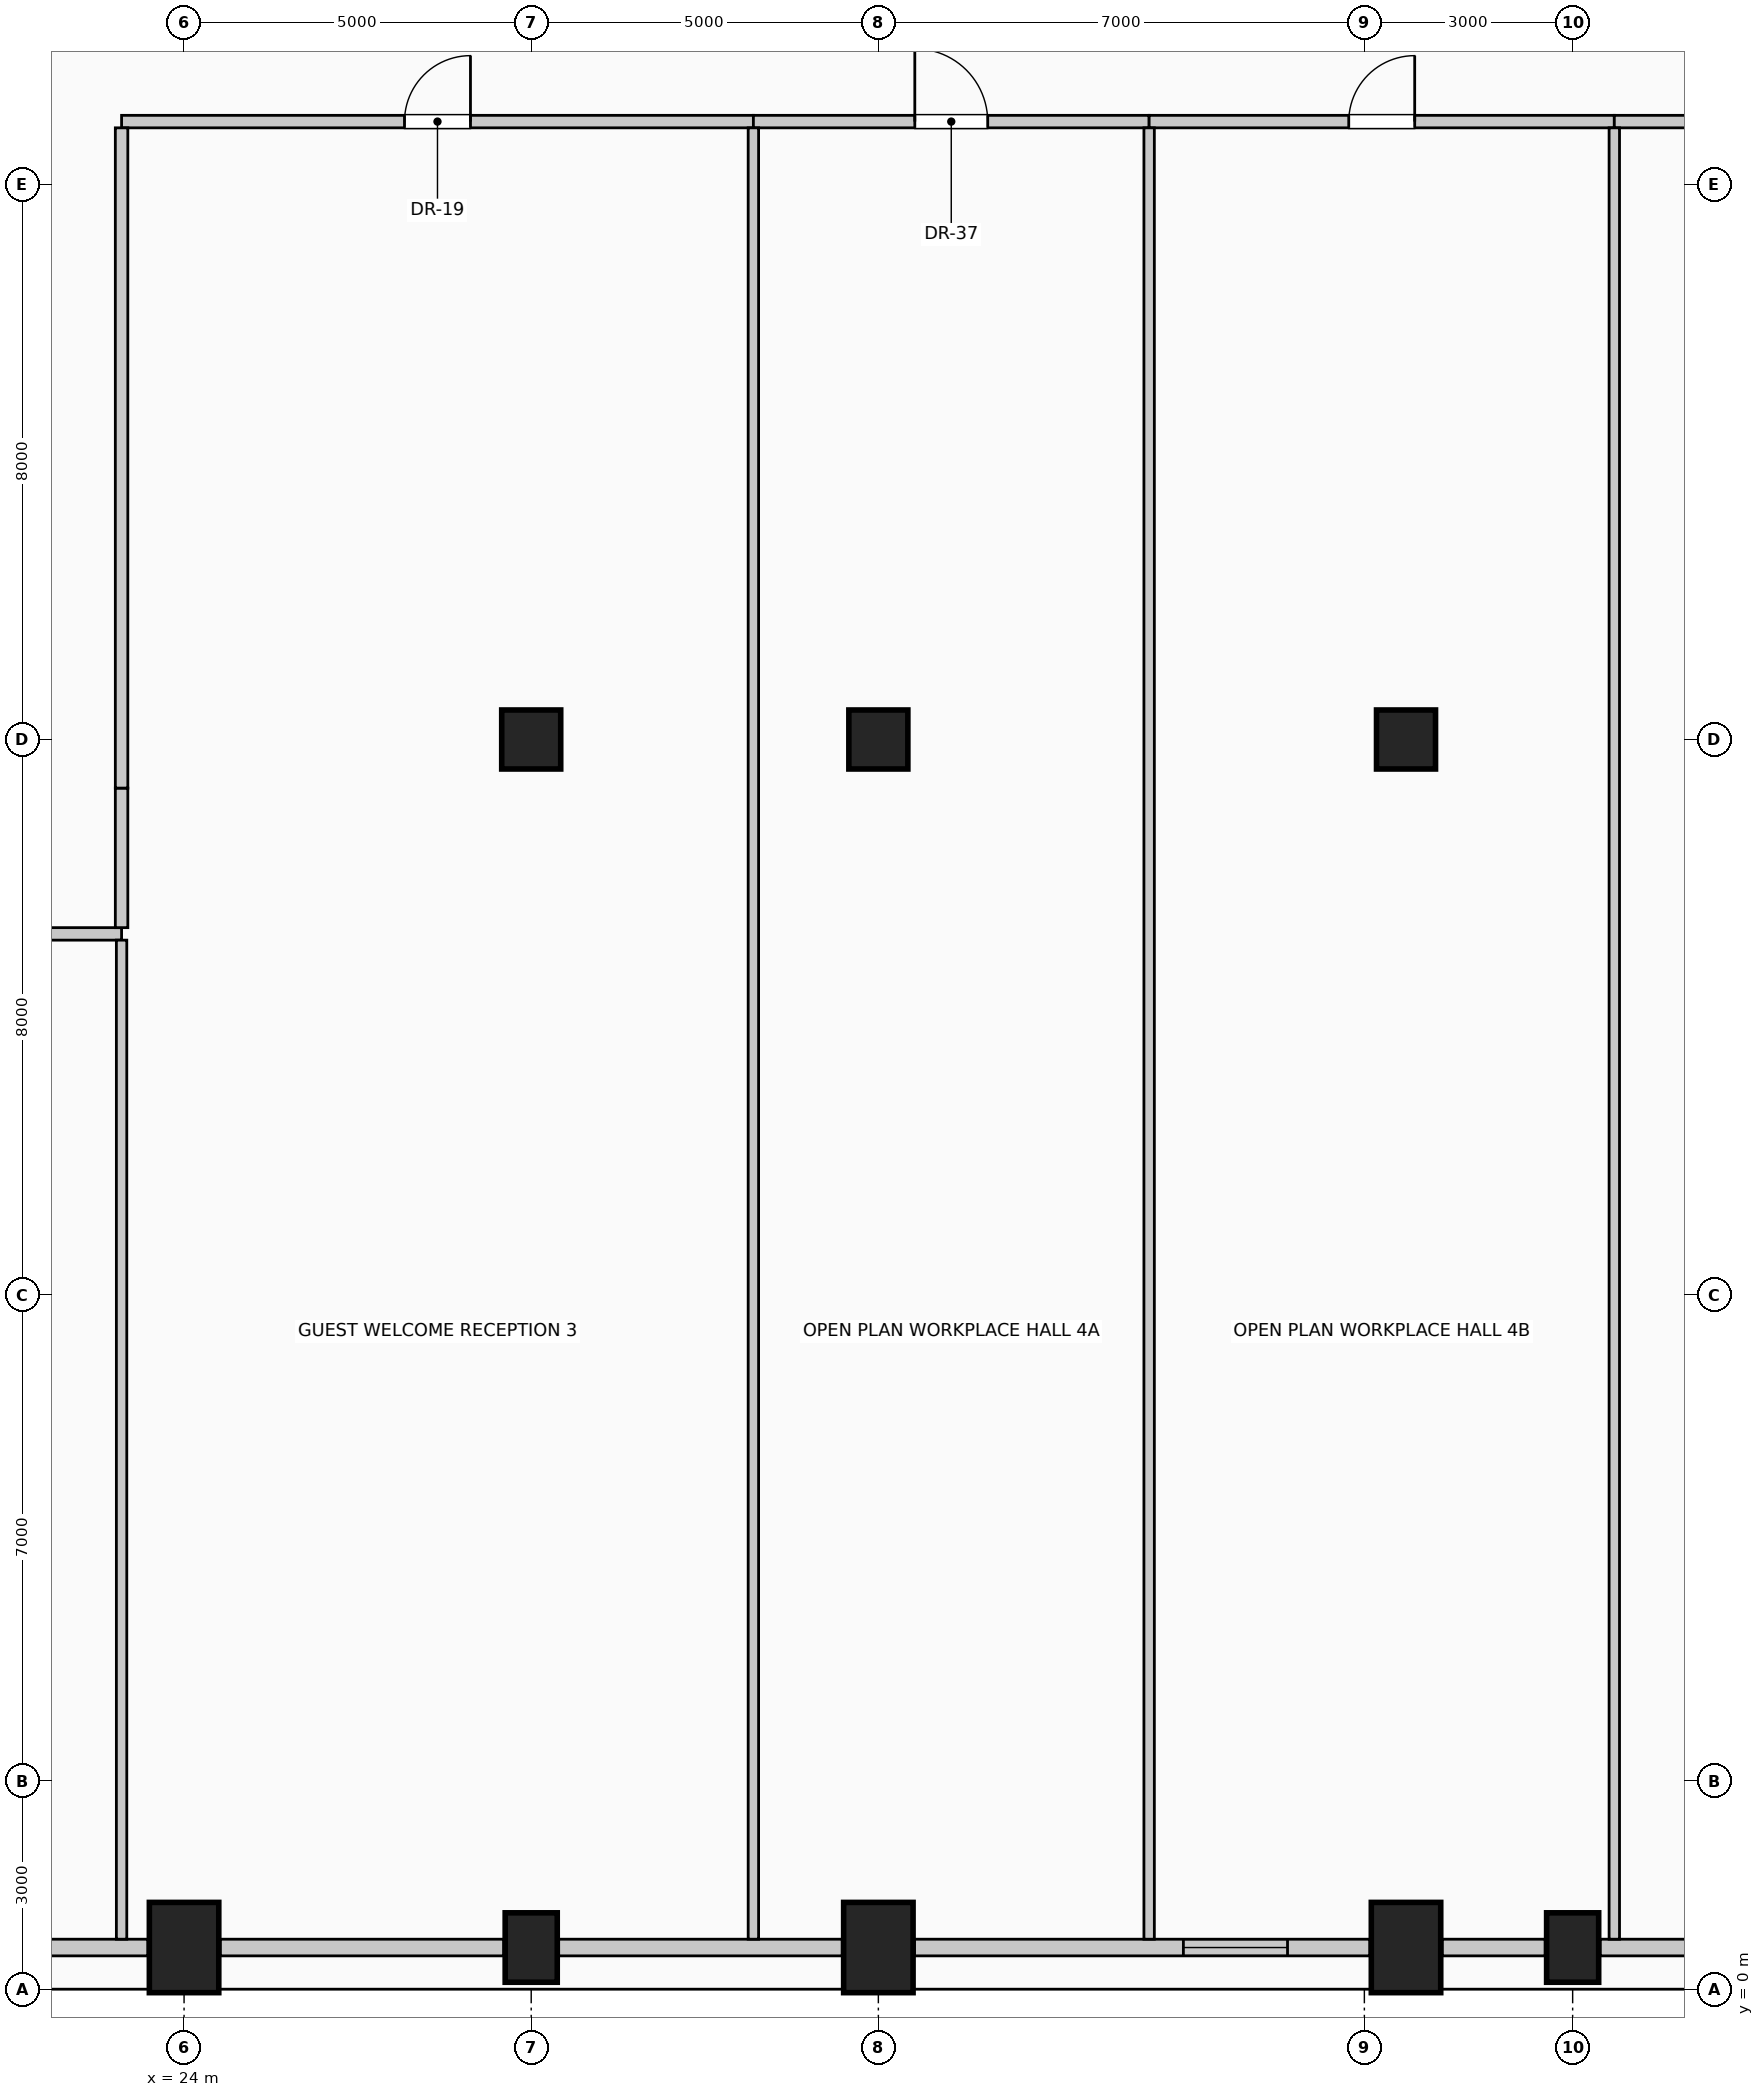
"""IFC4 building model, lengths in metres.
Left out: names, types, materials, properties, quantities, classifications, styles, units other than length and angle.
Written with IfcOpenShell. Run it as: python <this file> out.ifc"""

import sys

from ifc_helpers import new_model, si_unit, direction, frame, frame_2d, origin, origin_2d, place, context, subcontext, project, spatial, rectangle, circle, extrude, element, fill, save


model = new_model("IFC4")
c1 = context("Model", 3, precision=1e-05, world=origin(), true_north=direction((0.0, 1.0)))
c2 = subcontext(c1, "Body", "Model", "MODEL_VIEW")
j1 = project(units=[si_unit("LENGTHUNIT", "METRE"), si_unit("PLANEANGLEUNIT", "RADIAN")], contexts=[c1])
p1 = place(None, origin())
s1 = spatial("IfcSite", under=j1, at=p1, CompositionType="ELEMENT")
p2 = place(p1, origin())
s2 = spatial("IfcBuilding", under=s1, at=p2, CompositionType="ELEMENT")
p3 = place(p2, frame((0.0, 0.0, 226.6)))
s3 = spatial("IfcBuildingStorey", under=s2, at=p3, CompositionType="ELEMENT", Elevation=226.6)
p4 = place(p3, frame((24.0, 0.6, 0.0), z_axis=(0.0, 0.0, 1.0), x_axis=(1.0, 0.0, 0.0)))
e1 = element("IfcColumn", 1, at=p4, inside=s3, PredefinedType="COLUMN", context=c2, shape_type="SweptSolid", body=[
    extrude(rectangle(XDim=1.0, YDim=1.3, at=origin_2d()), origin(), (0.0, 0.0, 1.0), 4.0),
])
p5 = place(p3, frame((29.0, 0.6, 0.0), z_axis=(0.0, 0.0, 1.0), x_axis=(1.0, 0.0, 0.0)))
e2 = element("IfcColumn", 2, at=p5, inside=s3, PredefinedType="COLUMN", context=c2, shape_type="SweptSolid", body=[
    extrude(rectangle(XDim=0.75, YDim=1.0, at=origin_2d()), origin(), (0.0, 0.0, 1.0), 4.0),
])
for number, where, z_axis, x_axis in (
    (3, (34.0, 0.6, 0.0), (0.0, 0.0, 1.0), (1.0, 0.0, 0.0)),
    (4, (41.6, 0.6, 0.0), (0.0, 0.0, 1.0), (1.0, 0.0, 0.0)),
):
    element("IfcColumn", number, at=place(p3, frame(where, z_axis=z_axis, x_axis=x_axis)), inside=s3, PredefinedType="COLUMN", context=c2, shape_type="SweptSolid", body=[
        extrude(rectangle(XDim=1.0, YDim=1.3, at=origin_2d()), origin(), (0.0, 0.0, 1.0), 4.0),
    ])
p6 = place(p3, frame((44.0, 0.6, 0.0), z_axis=(0.0, 0.0, 1.0), x_axis=(1.0, 0.0, 0.0)))
e5 = element("IfcColumn", 5, at=p6, inside=s3, PredefinedType="COLUMN", context=c2, shape_type="SweptSolid", body=[
    extrude(rectangle(XDim=0.75, YDim=1.0, at=origin_2d()), origin(), (0.0, 0.0, 1.0), 4.0),
])
for number, where, z_axis, x_axis in (
    (6, (29.0, 18.0, 0.0), (0.0, 0.0, 1.0), (1.0, 0.0, 0.0)),
    (7, (41.6, 18.0, 0.0), (0.0, 0.0, 1.0), (1.0, 0.0, 0.0)),
    (8, (34.0, 18.0, 0.0), (0.0, 0.0, 1.0), (1.0, 0.0, 0.0)),
):
    element("IfcColumn", number, at=place(p3, frame(where, z_axis=z_axis, x_axis=x_axis)), inside=s3, PredefinedType="COLUMN", context=c2, shape_type="SweptSolid", body=[
        extrude(circle(Radius=0.425, at=origin_2d()), origin(), (0.0, 0.0, 1.0), 4.0),
    ])
p7 = place(p3, frame((23.48, 0.6, 0.0), z_axis=(0.0, 0.0, 1.0), x_axis=(-1.0, 0.0, 0.0)))
e9 = element("IfcWall", 9, at=p7, inside=s3, PredefinedType="SOLIDWALL", context=c2, shape_type="SweptSolid", body=[
    extrude(rectangle(XDim=6.56, YDim=0.24, at=frame_2d((3.28, 0.0))), origin(), (0.0, 0.0, 1.0), 3.0),
])
p8 = place(p7, frame((3.873, 0.0, 0.42)))
e10 = element("IfcOpeningElement", 10, at=p8, cuts=e9, PredefinedType="OPENING", context=c2, shape_type="SweptSolid", body=[
    extrude(rectangle(XDim=1.5, YDim=2.2, at=frame_2d((0.75, 1.1))), frame((0.0, 0.13, 0.0), z_axis=(0.0, -1.0, 0.0), x_axis=(1.0, 0.0, 0.0)), (0.0, 0.0, 1.0), 0.26),
])
for number, where, z_axis, x_axis in (
    (11, (28.605, 0.6, 0.0), (0.0, 0.0, 1.0), (-1.0, 0.0, 0.0)),
    (12, (33.48, 0.6, 0.0), (0.0, 0.0, 1.0), (-1.0, 0.0, 0.0)),
):
    element("IfcWall", number, at=place(p3, frame(where, z_axis=z_axis, x_axis=x_axis)), inside=s3, PredefinedType="SOLIDWALL", context=c2, shape_type="SweptSolid", body=[
        extrude(rectangle(XDim=4.085, YDim=0.24, at=frame_2d((2.042, 0.0))), origin(), (0.0, 0.0, 1.0), 3.0),
    ])
p9 = place(p3, frame((41.08, 0.6, 0.0), z_axis=(0.0, 0.0, 1.0), x_axis=(-1.0, 0.0, 0.0)))
e13 = element("IfcWall", 13, at=p9, inside=s3, PredefinedType="SOLIDWALL", context=c2, shape_type="SweptSolid", body=[
    extrude(rectangle(XDim=6.56, YDim=0.24, at=frame_2d((3.28, 0.0))), origin(), (0.0, 0.0, 1.0), 3.0),
])
p10 = place(p9, frame((1.187, 0.0, 0.42)))
e14 = element("IfcOpeningElement", 14, at=p10, cuts=e13, PredefinedType="OPENING", context=c2, shape_type="SweptSolid", body=[
    extrude(rectangle(XDim=1.5, YDim=2.2, at=frame_2d((0.75, 1.1))), frame((0.0, 0.13, 0.0), z_axis=(0.0, -1.0, 0.0), x_axis=(1.0, 0.0, 0.0)), (0.0, 0.0, 1.0), 0.26),
])
p11 = place(p3, frame((43.605, 0.6, 0.0), z_axis=(0.0, 0.0, 1.0), x_axis=(-1.0, 0.0, 0.0)))
e15 = element("IfcWall", 15, at=p11, inside=s3, PredefinedType="SOLIDWALL", context=c2, shape_type="SweptSolid", body=[
    extrude(rectangle(XDim=1.485, YDim=0.24, at=frame_2d((0.742, 0.0))), origin(), (0.0, 0.0, 1.0), 3.0),
])
p12 = place(p3, frame((49.105, 0.6, 0.0), z_axis=(0.0, 0.0, 1.0), x_axis=(-1.0, 0.0, 0.0)))
e16 = element("IfcWall", 16, at=p12, inside=s3, PredefinedType="SOLIDWALL", context=c2, shape_type="SweptSolid", body=[
    extrude(rectangle(XDim=4.71, YDim=0.24, at=frame_2d((2.355, 0.0))), origin(), (0.0, 0.0, 1.0), 3.0),
])
p13 = place(p3, frame((8.5, 15.2, 0.0), z_axis=(0.0, 0.0, 1.0), x_axis=(1.0, 0.0, 0.0)))
e17 = element("IfcWall", 17, at=p13, inside=s3, PredefinedType="PARTITIONING", context=c2, shape_type="SweptSolid", body=[
    extrude(rectangle(XDim=14.6, YDim=0.18, at=frame_2d((7.3, 0.0))), origin(), (0.0, 0.0, 1.0), 3.75),
])
p14 = place(p13, frame((6.775, 0.0, 0.0)))
e18 = element("IfcOpeningElement", 18, at=p14, cuts=e17, PredefinedType="OPENING", context=c2, shape_type="SweptSolid", body=[
    extrude(rectangle(XDim=1.05, YDim=2.15, at=frame_2d((0.525, 1.075))), frame((0.0, 0.1, 0.0), z_axis=(0.0, -1.0, 0.0), x_axis=(1.0, 0.0, 0.0)), (0.0, 0.0, 1.0), 0.2),
])
p15 = place(p3, frame((23.1, 26.9, 0.0), z_axis=(0.0, 0.0, 1.0), x_axis=(1.0, 0.0, 0.0)))
e19 = element("IfcWall", 19, at=p15, inside=s3, PredefinedType="PARTITIONING", context=c2, shape_type="SweptSolid", body=[
    extrude(rectangle(XDim=9.1, YDim=0.18, at=frame_2d((4.55, 0.0))), origin(), (0.0, 0.0, 1.0), 3.75),
])
p16 = place(p15, frame((4.075, 0.0, 0.0)))
e20 = element("IfcOpeningElement", 20, at=p16, cuts=e19, PredefinedType="OPENING", context=c2, shape_type="SweptSolid", body=[
    extrude(rectangle(XDim=0.95, YDim=2.15, at=frame_2d((0.475, 1.075))), frame((0.0, 0.1, 0.0), z_axis=(0.0, -1.0, 0.0), x_axis=(1.0, 0.0, 0.0)), (0.0, 0.0, 1.0), 0.2),
])
p17 = place(p3, frame((32.2, 26.9, 0.0), z_axis=(0.0, 0.0, 1.0), x_axis=(1.0, 0.0, 0.0)))
e21 = element("IfcWall", 21, at=p17, inside=s3, PredefinedType="PARTITIONING", context=c2, shape_type="SweptSolid", body=[
    extrude(rectangle(XDim=5.7, YDim=0.18, at=frame_2d((2.85, 0.0))), origin(), (0.0, 0.0, 1.0), 3.75),
])
p18 = place(p17, frame((2.325, 0.0, 0.0)))
e22 = element("IfcOpeningElement", 22, at=p18, cuts=e21, PredefinedType="OPENING", context=c2, shape_type="SweptSolid", body=[
    extrude(rectangle(XDim=1.05, YDim=2.15, at=frame_2d((0.525, 1.075))), frame((0.0, 0.1, 0.0), z_axis=(0.0, -1.0, 0.0), x_axis=(1.0, 0.0, 0.0)), (0.0, 0.0, 1.0), 0.2),
])
p19 = place(p3, frame((37.9, 26.9, 0.0), z_axis=(0.0, 0.0, 1.0), x_axis=(1.0, 0.0, 0.0)))
e23 = element("IfcWall", 23, at=p19, inside=s3, PredefinedType="PARTITIONING", context=c2, shape_type="SweptSolid", body=[
    extrude(rectangle(XDim=6.7, YDim=0.18, at=frame_2d((3.35, 0.0))), origin(), (0.0, 0.0, 1.0), 3.75),
])
p20 = place(p19, frame((2.875, 0.0, 0.0)))
e24 = element("IfcOpeningElement", 24, at=p20, cuts=e23, PredefinedType="OPENING", context=c2, shape_type="SweptSolid", body=[
    extrude(rectangle(XDim=0.95, YDim=2.15, at=frame_2d((0.475, 1.075))), frame((0.0, 0.1, 0.0), z_axis=(0.0, -1.0, 0.0), x_axis=(1.0, 0.0, 0.0)), (0.0, 0.0, 1.0), 0.2),
])
p21 = place(p3, frame((44.6, 26.9, 0.0), z_axis=(0.0, 0.0, 1.0), x_axis=(1.0, 0.0, 0.0)))
e25 = element("IfcWall", 25, at=p21, inside=s3, PredefinedType="PARTITIONING", context=c2, shape_type="SweptSolid", body=[
    extrude(rectangle(XDim=12.68, YDim=0.18, at=frame_2d((6.34, 0.0))), origin(), (0.0, 0.0, 1.0), 3.75),
])
p22 = place(p21, frame((5.815, 0.0, 0.0)))
e26 = element("IfcOpeningElement", 26, at=p22, cuts=e25, PredefinedType="OPENING", context=c2, shape_type="SweptSolid", body=[
    extrude(rectangle(XDim=1.05, YDim=2.15, at=frame_2d((0.525, 1.075))), frame((0.0, 0.1, 0.0), z_axis=(0.0, -1.0, 0.0), x_axis=(1.0, 0.0, 0.0)), (0.0, 0.0, 1.0), 0.2),
])
p23 = place(p3, frame((23.1, 0.72, 0.0), z_axis=(0.0, 0.0, 1.0), x_axis=(0.0, 1.0, 0.0)))
e27 = element("IfcWall", 27, at=p23, inside=s3, PredefinedType="PARTITIONING", context=c2, shape_type="SweptSolid", body=[
    extrude(rectangle(XDim=14.39, YDim=0.15, at=frame_2d((7.195, 0.0))), origin(), (0.0, 0.0, 1.0), 3.75),
])
p24 = place(p3, frame((23.1, 15.29, 0.0), z_axis=(0.0, 0.0, 1.0), x_axis=(0.0, 1.0, 0.0)))
e28 = element("IfcWall", 28, at=p24, inside=s3, PredefinedType="PARTITIONING", context=c2, shape_type="SweptSolid", body=[
    extrude(rectangle(XDim=2.01, YDim=0.18, at=frame_2d((1.005, 0.0))), origin(), (0.0, 0.0, 1.0), 3.75),
])
p25 = place(p3, frame((23.1, 17.3, 0.0), z_axis=(0.0, 0.0, 1.0), x_axis=(0.0, 1.0, 0.0)))
e29 = element("IfcWall", 29, at=p25, inside=s3, PredefinedType="PARTITIONING", context=c2, shape_type="SweptSolid", body=[
    extrude(rectangle(XDim=9.51, YDim=0.18, at=frame_2d((4.755, 0.0))), origin(), (0.0, 0.0, 1.0), 3.75),
])
for number, where, z_axis, x_axis in (
    (30, (32.2, 0.72, 0.0), (0.0, 0.0, 1.0), (0.0, 1.0, 0.0)),
    (31, (37.9, 0.72, 0.0), (0.0, 0.0, 1.0), (0.0, 1.0, 0.0)),
    (32, (44.6, 0.72, 0.0), (0.0, 0.0, 1.0), (0.0, 1.0, 0.0)),
):
    element("IfcWall", number, at=place(p3, frame(where, z_axis=z_axis, x_axis=x_axis)), inside=s3, PredefinedType="PARTITIONING", context=c2, shape_type="SweptSolid", body=[
        extrude(rectangle(XDim=26.09, YDim=0.15, at=frame_2d((13.045, 0.0))), origin(), (0.0, 0.0, 1.0), 3.75),
    ])
p26 = place(p10, origin())
e33 = element("IfcWindow", 33, at=p26, inside=s3, PartitioningType="SINGLE_PANEL", PredefinedType="WINDOW", context=c2, shape_type="SweptSolid", body=[
    extrude(rectangle(XDim=1.5, YDim=2.2, at=frame_2d((0.75, 1.1))), frame((0.0, 0.03, 0.0), z_axis=(0.0, -1.0, 0.0), x_axis=(1.0, 0.0, 0.0)), (0.0, 0.0, 1.0), 0.06),
])
fill(e14, e33)
p27 = place(p16, origin())
e34 = element("IfcDoor", 34, at=p27, inside=s3, OperationType="SINGLE_SWING_RIGHT", PredefinedType="DOOR", context=c2, shape_type="SweptSolid", body=[
    extrude(rectangle(XDim=0.95, YDim=2.15, at=frame_2d((0.475, 1.075))), frame((0.0, 0.025, 0.0), z_axis=(0.0, -1.0, 0.0), x_axis=(1.0, 0.0, 0.0)), (0.0, 0.0, 1.0), 0.05),
])
fill(e20, e34)
p28 = place(p18, origin())
e35 = element("IfcDoor", 35, at=p28, inside=s3, OperationType="SINGLE_SWING_LEFT", PredefinedType="DOOR", context=c2, shape_type="SweptSolid", body=[
    extrude(rectangle(XDim=1.05, YDim=2.15, at=frame_2d((0.525, 1.075))), frame((0.0, 0.025, 0.0), z_axis=(0.0, -1.0, 0.0), x_axis=(1.0, 0.0, 0.0)), (0.0, 0.0, 1.0), 0.05),
])
fill(e22, e35)
p29 = place(p20, origin())
e36 = element("IfcDoor", 36, at=p29, inside=s3, OperationType="SINGLE_SWING_RIGHT", PredefinedType="DOOR", context=c2, shape_type="SweptSolid", body=[
    extrude(rectangle(XDim=0.95, YDim=2.15, at=frame_2d((0.475, 1.075))), frame((0.0, 0.025, 0.0), z_axis=(0.0, -1.0, 0.0), x_axis=(1.0, 0.0, 0.0)), (0.0, 0.0, 1.0), 0.05),
])
fill(e24, e36)
save(model, sys.argv[1])
